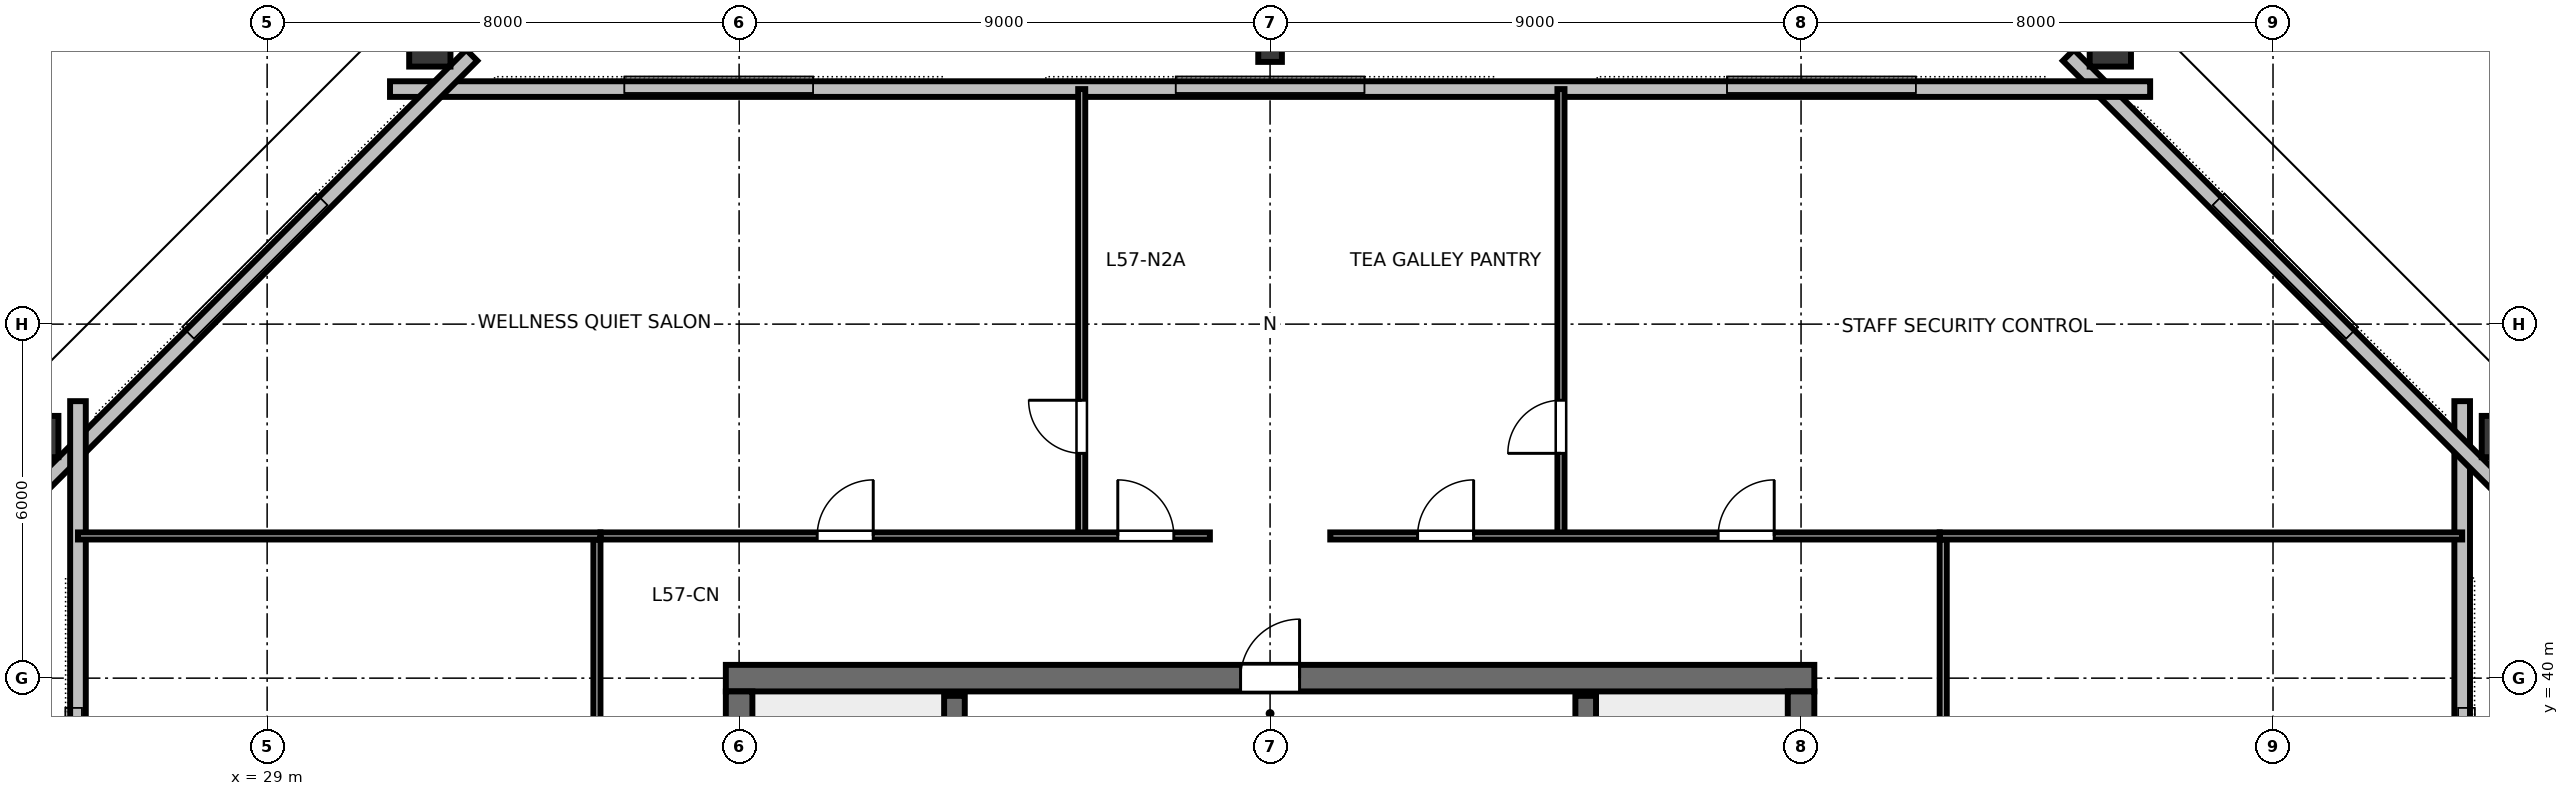
"""IFC4 building model, lengths in metres.
Left out: names, types, materials, properties, quantities, classifications, styles, units other than length and angle.
Written with IfcOpenShell. Run it as: python <this file> out.ifc"""

import sys

from ifc_helpers import new_model, si_unit, direction, frame, frame_2d, origin, origin_2d, place, context, subcontext, project, spatial, rectangle, hollow_rectangle, i_section, extrude, element, fill, save


model = new_model("IFC4")
c1 = context("Model", 3, precision=1e-05, world=origin(), true_north=direction((0.0, 1.0)))
c2 = subcontext(c1, "Body", "Model", "MODEL_VIEW")
j1 = project(units=[si_unit("LENGTHUNIT", "METRE"), si_unit("PLANEANGLEUNIT", "RADIAN")], contexts=[c1])
p1 = place(None, origin())
s1 = spatial("IfcSite", under=j1, at=p1, CompositionType="ELEMENT")
p2 = place(p1, origin())
s2 = spatial("IfcBuilding", under=s1, at=p2, CompositionType="ELEMENT")
p3 = place(p2, frame((0.0, 0.0, 216.6)))
s3 = spatial("IfcBuildingStorey", under=s2, at=p3, CompositionType="ELEMENT", Elevation=216.6)
p4 = place(p3, frame((36.775, 40.0, 0.0), z_axis=(0.0, 0.0, 1.0), x_axis=(1.0, 0.0, 0.0)))
e1 = element("IfcWall", 1, at=p4, inside=s3, PredefinedType="SHEAR", context=c2, shape_type="SweptSolid", body=[
    extrude(rectangle(XDim=18.45, YDim=0.45, at=frame_2d((9.225, 0.0))), origin(), (0.0, 0.0, 1.0), 3.36),
])
p5 = place(p4, frame((8.725, 0.0, 0.0)))
e2 = element("IfcOpeningElement", 2, at=p5, cuts=e1, PredefinedType="OPENING", context=c2, shape_type="SweptSolid", body=[
    extrude(rectangle(XDim=1.0, YDim=2.15, at=frame_2d((0.5, 1.075))), frame((0.0, 0.235, 0.0), z_axis=(0.0, -1.0, 0.0), x_axis=(1.0, 0.0, 0.0)), (0.0, 0.0, 1.0), 0.47),
])
p6 = place(p3, frame((37.0, 24.225, 0.0), z_axis=(0.0, 0.0, 1.0), x_axis=(0.0, 1.0, 0.0)))
e3 = element("IfcWall", 3, at=p6, inside=s3, PredefinedType="SHEAR", context=c2, shape_type="SweptSolid", body=[
    extrude(rectangle(XDim=15.55, YDim=0.45, at=frame_2d((7.775, 0.0))), origin(), (0.0, 0.0, 1.0), 3.36),
])
p7 = place(p6, frame((5.3, 0.0, 0.0)))
e4 = element("IfcOpeningElement", 4, at=p7, cuts=e3, PredefinedType="OPENING", context=c2, shape_type="SweptSolid", body=[
    extrude(rectangle(XDim=1.15, YDim=2.15, at=frame_2d((0.575, 1.075))), frame((0.0, 0.235, 0.0), z_axis=(0.0, -1.0, 0.0), x_axis=(1.0, 0.0, 0.0)), (0.0, 0.0, 1.0), 0.47),
])
p8 = place(p3, frame((55.0, 24.225, 0.0), z_axis=(0.0, 0.0, 1.0), x_axis=(0.0, 1.0, 0.0)))
e5 = element("IfcWall", 5, at=p8, inside=s3, PredefinedType="SHEAR", context=c2, shape_type="SweptSolid", body=[
    extrude(rectangle(XDim=15.55, YDim=0.45, at=frame_2d((7.775, 0.0))), origin(), (0.0, 0.0, 1.0), 3.36),
])
p9 = place(p8, frame((5.3, 0.0, 0.0)))
e6 = element("IfcOpeningElement", 6, at=p9, cuts=e5, PredefinedType="OPENING", context=c2, shape_type="SweptSolid", body=[
    extrude(rectangle(XDim=1.15, YDim=2.15, at=frame_2d((0.575, 1.075))), frame((0.0, 0.235, 0.0), z_axis=(0.0, -1.0, 0.0), x_axis=(1.0, 0.0, 0.0)), (0.0, 0.0, 1.0), 0.47),
])
p10 = place(p3, frame((66.963, 44.095, 0.0), z_axis=(-0.177528506803, -0.155864964768, 0.97169426366), x_axis=(0.730198143029, 0.641093139838, 0.236241947947)))
e7 = element("IfcColumn", 7, at=p10, inside=s3, PredefinedType="COLUMN", context=c2, shape_type="SweptSolid", body=[
    extrude(hollow_rectangle(XDim=0.7, YDim=0.85, WallThickness=0.04, at=origin_2d()), origin(), (0.0, 0.0, 1.0), 3.471),
])
p11 = place(p3, frame((60.242, 50.79, 0.0), z_axis=(-0.205790080225, -0.127126295292, 0.970303740035), x_axis=(0.525554697107, -0.850759813548, 0.0)))
e8 = element("IfcColumn", 8, at=p11, inside=s3, PredefinedType="COLUMN", context=c2, shape_type="SweptSolid", body=[
    extrude(hollow_rectangle(XDim=0.7, YDim=0.85, WallThickness=0.04, at=origin_2d()), origin(), (0.0, 0.0, 1.0), 3.476),
])
p12 = place(p3, frame((46.0, 50.644, 0.0), z_axis=(0.0, -0.128283388035, 0.991737552155), x_axis=(1.0, 0.0, 0.0)))
e9 = element("IfcColumn", 9, at=p12, inside=s3, PredefinedType="COLUMN", context=c2, shape_type="SweptSolid", body=[
    extrude(i_section(OverallWidth=0.401, OverallDepth=0.399, WebThickness=0.025, FlangeThickness=0.04, FilletRadius=0.025, at=origin_2d()), origin(), (0.0, 0.0, 1.0), 3.401),
])
p13 = place(p3, frame((31.758, 50.79, 0.0), z_axis=(0.205790080225, -0.127126295292, 0.970303740035), x_axis=(0.525554697107, 0.850759813548, 0.0)))
e10 = element("IfcColumn", 10, at=p13, inside=s3, PredefinedType="COLUMN", context=c2, shape_type="SweptSolid", body=[
    extrude(hollow_rectangle(XDim=0.7, YDim=0.85, WallThickness=0.04, at=origin_2d()), origin(), (0.0, 0.0, 1.0), 3.476),
])
p14 = place(p3, frame((25.037, 44.095, 0.0), z_axis=(0.177528506803, -0.155864964768, 0.97169426366), x_axis=(-0.730198143029, 0.641093139838, 0.236241947947)))
e11 = element("IfcColumn", 11, at=p14, inside=s3, PredefinedType="COLUMN", context=c2, shape_type="SweptSolid", body=[
    extrude(hollow_rectangle(XDim=0.7, YDim=0.85, WallThickness=0.04, at=origin_2d()), origin(), (0.0, 0.0, 1.0), 3.471),
])
p15 = place(p3, frame((66.206, 19.305, 0.0), z_axis=(0.0, 0.0, 1.0), x_axis=(0.0, 1.0, 0.0)))
e12 = element("IfcWall", 12, at=p15, inside=s3, PredefinedType="STANDARD", context=c2, shape_type="SweptSolid", body=[
    extrude(rectangle(XDim=25.389, YDim=0.265, at=frame_2d((12.695, 0.0))), origin(), (0.0, 0.0, 1.0), 2.832),
])
p16 = place(p3, frame((66.78, 43.309, 0.0), z_axis=(0.0, 0.0, 1.0), x_axis=(-0.707106781187, 0.707106781187, 0.0)))
e13 = element("IfcWall", 13, at=p16, inside=s3, PredefinedType="STANDARD", context=c2, shape_type="SweptSolid", body=[
    extrude(rectangle(XDim=10.251, YDim=0.265, at=frame_2d((5.125, 0.0))), origin(), (0.0, 0.0, 1.0), 2.832),
])
p17 = place(p3, frame((60.917, 49.984, 0.0), z_axis=(0.0, 0.0, 1.0), x_axis=(-1.0, 0.0, 0.0)))
e14 = element("IfcWall", 14, at=p17, inside=s3, PredefinedType="STANDARD", context=c2, shape_type="SweptSolid", body=[
    extrude(rectangle(XDim=29.834, YDim=0.265, at=frame_2d((14.917, 0.0))), origin(), (0.0, 0.0, 1.0), 2.832),
])
p18 = place(p3, frame((32.468, 50.558, 0.0), z_axis=(0.0, 0.0, 1.0), x_axis=(-0.707106781187, -0.707106781187, 0.0)))
e15 = element("IfcWall", 15, at=p18, inside=s3, PredefinedType="STANDARD", context=c2, shape_type="SweptSolid", body=[
    extrude(rectangle(XDim=10.251, YDim=0.265, at=frame_2d((5.125, 0.0))), origin(), (0.0, 0.0, 1.0), 2.832),
])
p19 = place(p3, frame((25.794, 44.695, 0.0), z_axis=(0.0, 0.0, 1.0), x_axis=(0.0, -1.0, 0.0)))
e16 = element("IfcWall", 16, at=p19, inside=s3, PredefinedType="STANDARD", context=c2, shape_type="SweptSolid", body=[
    extrude(rectangle(XDim=25.389, YDim=0.265, at=frame_2d((12.695, 0.0))), origin(), (0.0, 0.0, 1.0), 2.832),
])
for number, where, z_axis, x_axis in (
    (17, (40.65, 32.0, 0.0), (0.0, 0.0, 1.0), (0.0, 1.0, 0.0)),
    (18, (51.35, 32.0, 0.0), (0.0, 0.0, 1.0), (0.0, 1.0, 0.0)),
):
    element("IfcWall", number, at=place(p3, frame(where, z_axis=z_axis, x_axis=x_axis)), inside=s3, PredefinedType="SHEAR", context=c2, shape_type="SweptSolid", body=[
        extrude(rectangle(XDim=7.7, YDim=0.35, at=frame_2d((3.85, 0.0))), origin(), (0.0, 0.0, 1.0), 3.6),
    ])
p20 = place(p3, frame((42.807, 42.41, 0.0), z_axis=(0.0, 0.0, 1.0), x_axis=(0.0, 1.0, 0.0)))
e19 = element("IfcWall", 19, at=p20, inside=s3, PredefinedType="PARTITIONING", context=c2, shape_type="SweptSolid", body=[
    extrude(rectangle(XDim=7.574, YDim=0.12, at=frame_2d((3.787, 0.0))), origin(), (0.0, 0.0, 1.0), 2.655),
])
p21 = place(p20, frame((1.4, 0.0, 0.0)))
e20 = element("IfcOpeningElement", 20, at=p21, cuts=e19, PredefinedType="OPENING", context=c2, shape_type="SweptSolid", body=[
    extrude(rectangle(XDim=0.9, YDim=2.15, at=frame_2d((0.45, 1.075))), frame((0.0, 0.07, 0.0), z_axis=(0.0, -1.0, 0.0), x_axis=(1.0, 0.0, 0.0)), (0.0, 0.0, 1.0), 0.14),
])
p22 = place(p3, frame((50.93, 42.41, 0.0), z_axis=(0.0, 0.0, 1.0), x_axis=(0.0, 1.0, 0.0)))
e21 = element("IfcWall", 21, at=p22, inside=s3, PredefinedType="PARTITIONING", context=c2, shape_type="SweptSolid", body=[
    extrude(rectangle(XDim=7.574, YDim=0.12, at=frame_2d((3.787, 0.0))), origin(), (0.0, 0.0, 1.0), 2.655),
])
p23 = place(p22, frame((1.4, 0.0, 0.0)))
e22 = element("IfcOpeningElement", 22, at=p23, cuts=e21, PredefinedType="OPENING", context=c2, shape_type="SweptSolid", body=[
    extrude(rectangle(XDim=0.9, YDim=2.15, at=frame_2d((0.45, 1.075))), frame((0.0, 0.07, 0.0), z_axis=(0.0, -1.0, 0.0), x_axis=(1.0, 0.0, 0.0)), (0.0, 0.0, 1.0), 0.14),
])
p24 = place(p3, frame((34.65, 42.41, 0.0), z_axis=(0.0, 0.0, 1.0), x_axis=(1.0, 0.0, 0.0)))
e23 = element("IfcWall", 23, at=p24, inside=s3, PredefinedType="PARTITIONING", context=c2, shape_type="SweptSolid", body=[
    extrude(rectangle(XDim=10.33, YDim=0.12, at=frame_2d((5.165, 0.0))), origin(), (0.0, 0.0, 1.0), 2.655),
])
p25 = place(p24, frame((3.674, 0.0, 0.0)))
e24 = element("IfcOpeningElement", 24, at=p25, cuts=e23, PredefinedType="OPENING", context=c2, shape_type="SweptSolid", body=[
    extrude(rectangle(XDim=0.95, YDim=2.15, at=frame_2d((0.475, 1.075))), frame((0.0, 0.07, 0.0), z_axis=(0.0, -1.0, 0.0), x_axis=(1.0, 0.0, 0.0)), (0.0, 0.0, 1.0), 0.14),
])
p26 = place(p24, frame((8.769, 0.0, 0.0)))
e25 = element("IfcOpeningElement", 25, at=p26, cuts=e23, PredefinedType="OPENING", context=c2, shape_type="SweptSolid", body=[
    extrude(rectangle(XDim=0.95, YDim=2.15, at=frame_2d((0.475, 1.075))), frame((0.0, 0.07, 0.0), z_axis=(0.0, -1.0, 0.0), x_axis=(1.0, 0.0, 0.0)), (0.0, 0.0, 1.0), 0.14),
])
p27 = place(p3, frame((47.02, 42.41, 0.0), z_axis=(0.0, 0.0, 1.0), x_axis=(1.0, 0.0, 0.0)))
e26 = element("IfcWall", 26, at=p27, inside=s3, PredefinedType="PARTITIONING", context=c2, shape_type="SweptSolid", body=[
    extrude(rectangle(XDim=10.33, YDim=0.12, at=frame_2d((5.165, 0.0))), origin(), (0.0, 0.0, 1.0), 2.655),
])
p28 = place(p27, frame((1.48, 0.0, 0.0)))
e27 = element("IfcOpeningElement", 27, at=p28, cuts=e26, PredefinedType="OPENING", context=c2, shape_type="SweptSolid", body=[
    extrude(rectangle(XDim=0.95, YDim=2.15, at=frame_2d((0.475, 1.075))), frame((0.0, 0.07, 0.0), z_axis=(0.0, -1.0, 0.0), x_axis=(1.0, 0.0, 0.0)), (0.0, 0.0, 1.0), 0.14),
])
p29 = place(p27, frame((6.575, 0.0, 0.0)))
e28 = element("IfcOpeningElement", 28, at=p29, cuts=e26, PredefinedType="OPENING", context=c2, shape_type="SweptSolid", body=[
    extrude(rectangle(XDim=0.95, YDim=2.15, at=frame_2d((0.475, 1.075))), frame((0.0, 0.07, 0.0), z_axis=(0.0, -1.0, 0.0), x_axis=(1.0, 0.0, 0.0)), (0.0, 0.0, 1.0), 0.14),
])
p30 = place(p3, frame((34.59, 21.65, 0.0), z_axis=(0.0, 0.0, 1.0), x_axis=(0.0, 1.0, 0.0)))
e29 = element("IfcWall", 29, at=p30, inside=s3, PredefinedType="PARTITIONING", context=c2, shape_type="SweptSolid", body=[
    extrude(rectangle(XDim=20.7, YDim=0.12, at=frame_2d((10.35, 0.0))), origin(), (0.0, 0.0, 1.0), 2.655),
])
p31 = place(p30, frame((9.875, 0.0, 0.0)))
e30 = element("IfcOpeningElement", 30, at=p31, cuts=e29, PredefinedType="OPENING", context=c2, shape_type="SweptSolid", body=[
    extrude(rectangle(XDim=0.95, YDim=2.15, at=frame_2d((0.475, 1.075))), frame((0.0, 0.07, 0.0), z_axis=(0.0, -1.0, 0.0), x_axis=(1.0, 0.0, 0.0)), (0.0, 0.0, 1.0), 0.14),
])
p32 = place(p3, frame((57.41, 21.65, 0.0), z_axis=(0.0, 0.0, 1.0), x_axis=(0.0, 1.0, 0.0)))
e31 = element("IfcWall", 31, at=p32, inside=s3, PredefinedType="PARTITIONING", context=c2, shape_type="SweptSolid", body=[
    extrude(rectangle(XDim=20.7, YDim=0.12, at=frame_2d((10.35, 0.0))), origin(), (0.0, 0.0, 1.0), 2.655),
])
p33 = place(p32, frame((3.546, 0.0, 0.0)))
e32 = element("IfcOpeningElement", 32, at=p33, cuts=e31, PredefinedType="OPENING", context=c2, shape_type="SweptSolid", body=[
    extrude(rectangle(XDim=0.95, YDim=2.15, at=frame_2d((0.475, 1.075))), frame((0.0, 0.07, 0.0), z_axis=(0.0, -1.0, 0.0), x_axis=(1.0, 0.0, 0.0)), (0.0, 0.0, 1.0), 0.14),
])
p34 = place(p32, frame((10.054, 0.0, 0.0)))
e33 = element("IfcOpeningElement", 33, at=p34, cuts=e31, PredefinedType="OPENING", context=c2, shape_type="SweptSolid", body=[
    extrude(rectangle(XDim=0.95, YDim=2.15, at=frame_2d((0.475, 1.075))), frame((0.0, 0.07, 0.0), z_axis=(0.0, -1.0, 0.0), x_axis=(1.0, 0.0, 0.0)), (0.0, 0.0, 1.0), 0.14),
])
p35 = place(p32, frame((16.384, 0.0, 0.0)))
e34 = element("IfcOpeningElement", 34, at=p35, cuts=e31, PredefinedType="OPENING", context=c2, shape_type="SweptSolid", body=[
    extrude(rectangle(XDim=0.95, YDim=2.15, at=frame_2d((0.475, 1.075))), frame((0.0, 0.07, 0.0), z_axis=(0.0, -1.0, 0.0), x_axis=(1.0, 0.0, 0.0)), (0.0, 0.0, 1.0), 0.14),
])
for number, where, z_axis, x_axis in (
    (35, (34.65, 42.41, 0.0), (0.0, 0.0, 1.0), (-1.0, 0.0, 0.0)),
    (36, (57.35, 42.41, 0.0), (0.0, 0.0, 1.0), (1.0, 0.0, 0.0)),
):
    element("IfcWall", number, at=place(p3, frame(where, z_axis=z_axis, x_axis=x_axis)), inside=s3, PredefinedType="PARTITIONING", context=c2, shape_type="SweptSolid", body=[
        extrude(rectangle(XDim=8.856, YDim=0.12, at=frame_2d((4.428, 0.0))), origin(), (0.0, 0.0, 1.0), 2.655),
    ])
p36 = place(p5, origin())
e37 = element("IfcDoor", 37, at=p36, inside=s3, OperationType="SINGLE_SWING_RIGHT", PredefinedType="DOOR", context=c2, shape_type="SweptSolid", body=[
    extrude(rectangle(XDim=1.0, YDim=2.15, at=frame_2d((0.5, 1.075))), frame((0.0, 0.025, 0.0), z_axis=(0.0, -1.0, 0.0), x_axis=(1.0, 0.0, 0.0)), (0.0, 0.0, 1.0), 0.05),
])
fill(e2, e37)
p37 = place(p21, origin())
e38 = element("IfcDoor", 38, at=p37, inside=s3, OperationType="SINGLE_SWING_RIGHT", PredefinedType="DOOR", context=c2, shape_type="SweptSolid", body=[
    extrude(rectangle(XDim=0.9, YDim=2.15, at=frame_2d((0.45, 1.075))), frame((0.0, 0.025, 0.0), z_axis=(0.0, -1.0, 0.0), x_axis=(1.0, 0.0, 0.0)), (0.0, 0.0, 1.0), 0.05),
])
fill(e20, e38)
p38 = place(p23, origin())
e39 = element("IfcDoor", 39, at=p38, inside=s3, OperationType="SINGLE_SWING_LEFT", PredefinedType="DOOR", context=c2, shape_type="SweptSolid", body=[
    extrude(rectangle(XDim=0.9, YDim=2.15, at=frame_2d((0.45, 1.075))), frame((0.0, 0.025, 0.0), z_axis=(0.0, -1.0, 0.0), x_axis=(1.0, 0.0, 0.0)), (0.0, 0.0, 1.0), 0.05),
])
fill(e22, e39)
p39 = place(p25, origin())
e40 = element("IfcDoor", 40, at=p39, inside=s3, OperationType="SINGLE_SWING_RIGHT", PredefinedType="DOOR", context=c2, shape_type="SweptSolid", body=[
    extrude(rectangle(XDim=0.95, YDim=2.15, at=frame_2d((0.475, 1.075))), frame((0.0, 0.025, 0.0), z_axis=(0.0, -1.0, 0.0), x_axis=(1.0, 0.0, 0.0)), (0.0, 0.0, 1.0), 0.05),
])
fill(e24, e40)
p40 = place(p26, origin())
e41 = element("IfcDoor", 41, at=p40, inside=s3, OperationType="SINGLE_SWING_LEFT", PredefinedType="DOOR", context=c2, shape_type="SweptSolid", body=[
    extrude(rectangle(XDim=0.95, YDim=2.15, at=frame_2d((0.475, 1.075))), frame((0.0, 0.025, 0.0), z_axis=(0.0, -1.0, 0.0), x_axis=(1.0, 0.0, 0.0)), (0.0, 0.0, 1.0), 0.05),
])
fill(e25, e41)
p41 = place(p28, origin())
e42 = element("IfcDoor", 42, at=p41, inside=s3, OperationType="SINGLE_SWING_RIGHT", PredefinedType="DOOR", context=c2, shape_type="SweptSolid", body=[
    extrude(rectangle(XDim=0.95, YDim=2.15, at=frame_2d((0.475, 1.075))), frame((0.0, 0.025, 0.0), z_axis=(0.0, -1.0, 0.0), x_axis=(1.0, 0.0, 0.0)), (0.0, 0.0, 1.0), 0.05),
])
fill(e27, e42)
p42 = place(p29, origin())
e43 = element("IfcDoor", 43, at=p42, inside=s3, OperationType="SINGLE_SWING_RIGHT", PredefinedType="DOOR", context=c2, shape_type="SweptSolid", body=[
    extrude(rectangle(XDim=0.95, YDim=2.15, at=frame_2d((0.475, 1.075))), frame((0.0, 0.025, 0.0), z_axis=(0.0, -1.0, 0.0), x_axis=(1.0, 0.0, 0.0)), (0.0, 0.0, 1.0), 0.05),
])
fill(e28, e43)
save(model, sys.argv[1])
